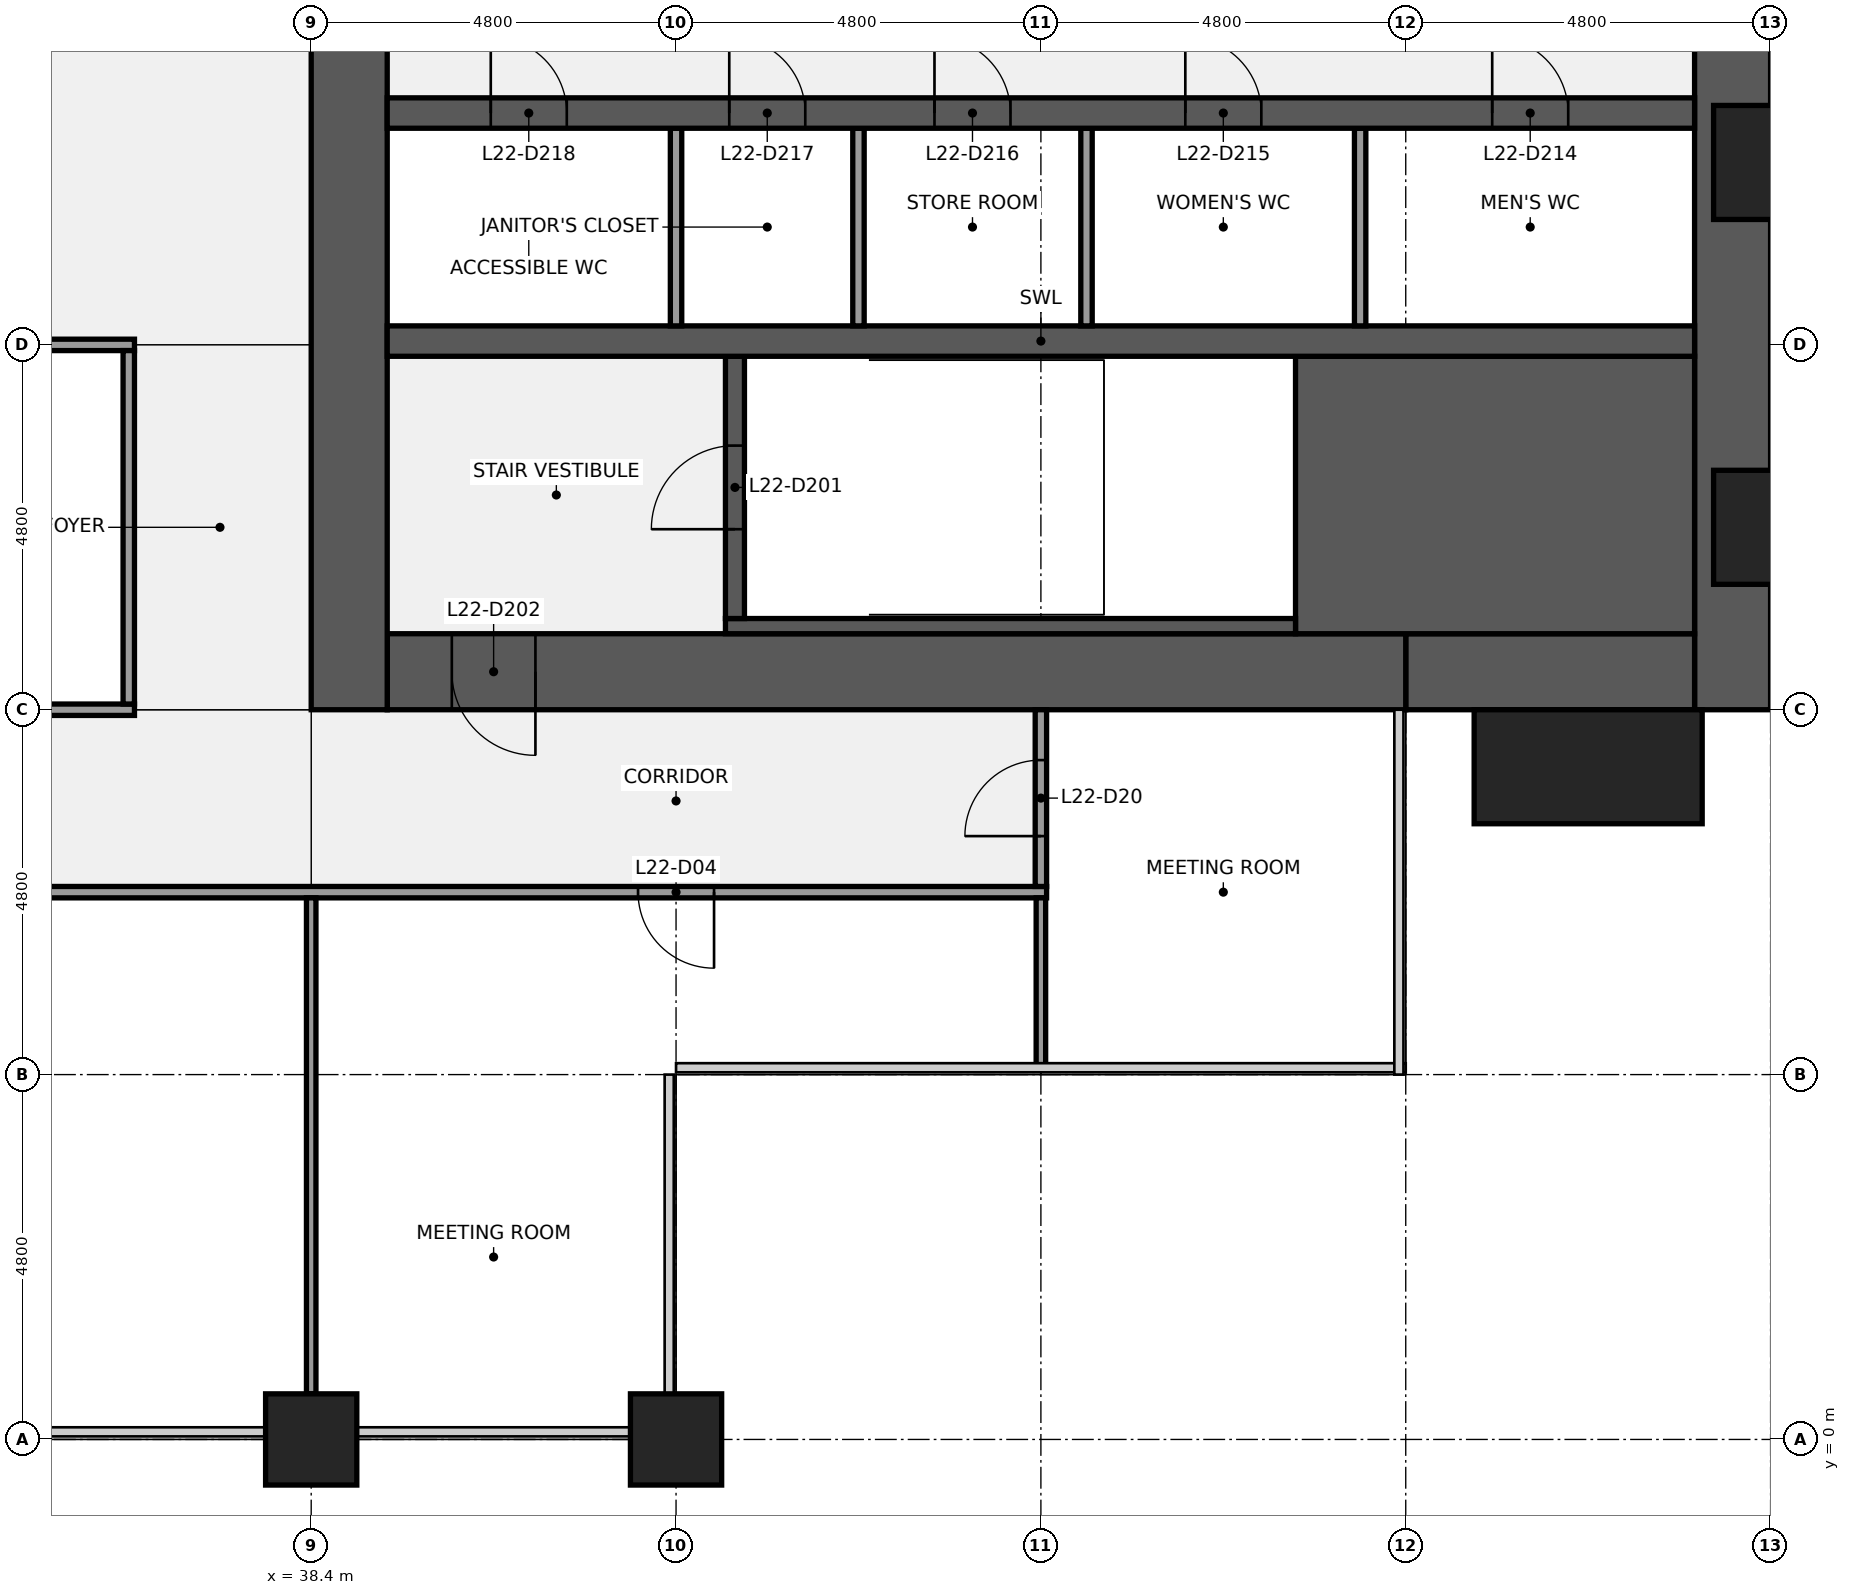
"""IFC4 building model, lengths in metres.
Left out: names, types, materials, properties, quantities, classifications, styles, units other than length and angle.
Written with IfcOpenShell. Run it as: python <this file> out.ifc"""

import sys

from ifc_helpers import new_model, si_unit, direction, frame, frame_2d, origin, origin_2d, place, context, subcontext, project, spatial, rectangle, extrude, element, fill, save


model = new_model("IFC4")
c1 = context("Model", 3, precision=1e-05, world=origin(), true_north=direction((0.0, 1.0)))
c2 = subcontext(c1, "Body", "Model", "MODEL_VIEW")
j1 = project(units=[si_unit("LENGTHUNIT", "METRE"), si_unit("PLANEANGLEUNIT", "RADIAN")], contexts=[c1])
p1 = place(None, origin())
s1 = spatial("IfcSite", under=j1, at=p1, CompositionType="ELEMENT")
p2 = place(p1, origin())
s2 = spatial("IfcBuilding", under=s1, at=p2, CompositionType="ELEMENT")
p3 = place(p2, frame((0.0, 0.0, 108.1)))
s3 = spatial("IfcBuildingStorey", under=s2, at=p3, CompositionType="ELEMENT", Elevation=108.1)
for number, where, z_axis, x_axis in (
    (1, (38.4, 0.0, 0.0), (0.0, 0.0, 1.0), (1.0, 0.0, 0.0)),
    (2, (43.2, 0.0, 0.0), (0.0, 0.0, 1.0), (1.0, 0.0, 0.0)),
):
    element("IfcColumn", number, at=place(p3, frame(where, z_axis=z_axis, x_axis=x_axis)), inside=s3, PredefinedType="COLUMN", context=c2, shape_type="SweptSolid", body=[
        extrude(rectangle(XDim=1.2, YDim=1.2, at=origin_2d()), origin(), (0.0, 0.0, 1.0), 4.0),
    ])
p4 = place(p3, frame((57.1, 38.4, 0.0), z_axis=(0.0, 0.0, 1.0), x_axis=(0.0, -1.0, 0.0)))
e3 = element("IfcWall", 3, at=p4, inside=s3, PredefinedType="SHEAR", context=c2, shape_type="SweptSolid", body=[
    extrude(rectangle(XDim=28.8, YDim=1.0, at=frame_2d((14.4, 0.0))), origin(), (0.0, 0.0, 1.0), 3.84),
])
p5 = place(p4, frame((18.45, 0.0, 0.9)))
e4 = element("IfcOpeningElement", 4, at=p5, cuts=e3, PredefinedType="OPENING", context=c2, shape_type="SweptSolid", body=[
    extrude(rectangle(XDim=1.5, YDim=1.5, at=frame_2d((0.75, 0.75))), frame((0.0, 0.51, 0.0), z_axis=(0.0, -1.0, 0.0), x_axis=(1.0, 0.0, 0.0)), (0.0, 0.0, 1.0), 1.02),
])
p6 = place(p4, frame((8.85, 0.0, 0.9)))
e5 = element("IfcOpeningElement", 5, at=p6, cuts=e3, PredefinedType="OPENING", context=c2, shape_type="SweptSolid", body=[
    extrude(rectangle(XDim=1.5, YDim=1.5, at=frame_2d((0.75, 0.75))), frame((0.0, 0.51, 0.0), z_axis=(0.0, -1.0, 0.0), x_axis=(1.0, 0.0, 0.0)), (0.0, 0.0, 1.0), 1.02),
])
p7 = place(p3, frame((56.6, 10.1, 0.0), z_axis=(0.0, 0.0, 1.0), x_axis=(-1.0, 0.0, 0.0)))
e6 = element("IfcWall", 6, at=p7, inside=s3, PredefinedType="SHEAR", context=c2, shape_type="SweptSolid", body=[
    extrude(rectangle(XDim=3.8, YDim=1.0, at=frame_2d((1.9, 0.0))), origin(), (0.0, 0.0, 1.0), 3.84),
])
p8 = place(p3, frame((52.8, 10.1, 0.0), z_axis=(0.0, 0.0, 1.0), x_axis=(-1.0, 0.0, 0.0)))
e7 = element("IfcWall", 7, at=p8, inside=s3, PredefinedType="SHEAR", context=c2, shape_type="SweptSolid", body=[
    extrude(rectangle(XDim=13.4, YDim=1.0, at=frame_2d((6.7, 0.0))), origin(), (0.0, 0.0, 1.0), 3.84),
])
p9 = place(p8, frame((11.45, 0.0, 0.0)))
e8 = element("IfcOpeningElement", 8, at=p9, cuts=e7, PredefinedType="OPENING", context=c2, shape_type="SweptSolid", body=[
    extrude(rectangle(XDim=1.1, YDim=2.1, at=frame_2d((0.55, 1.05))), frame((0.0, 0.51, 0.0), z_axis=(0.0, -1.0, 0.0), x_axis=(1.0, 0.0, 0.0)), (0.0, 0.0, 1.0), 1.02),
])
p10 = place(p3, frame((38.9, 9.6, 0.0), z_axis=(0.0, 0.0, 1.0), x_axis=(0.0, 1.0, 0.0)))
e9 = element("IfcWall", 9, at=p10, inside=s3, PredefinedType="SHEAR", context=c2, shape_type="SweptSolid", body=[
    extrude(rectangle(XDim=28.8, YDim=1.0, at=frame_2d((14.4, 0.0))), origin(), (0.0, 0.0, 1.0), 3.84),
])
p11 = place(p10, frame((8.7, 0.0, 0.0)))
e10 = element("IfcOpeningElement", 10, at=p11, cuts=e9, PredefinedType="OPENING", context=c2, shape_type="SweptSolid", body=[
    extrude(rectangle(XDim=1.8, YDim=2.1, at=frame_2d((0.9, 1.05))), frame((0.0, 0.51, 0.0), z_axis=(0.0, -1.0, 0.0), x_axis=(1.0, 0.0, 0.0)), (0.0, 0.0, 1.0), 1.02),
])
p12 = place(p10, frame((18.3, 0.0, 0.0)))
e11 = element("IfcOpeningElement", 11, at=p12, cuts=e9, PredefinedType="OPENING", context=c2, shape_type="SweptSolid", body=[
    extrude(rectangle(XDim=1.8, YDim=2.1, at=frame_2d((0.9, 1.05))), frame((0.0, 0.51, 0.0), z_axis=(0.0, -1.0, 0.0), x_axis=(1.0, 0.0, 0.0)), (0.0, 0.0, 1.0), 1.02),
])
p13 = place(p3, frame((51.35, 12.425, 0.0), z_axis=(0.0, 0.0, 1.0), x_axis=(1.0, 0.0, 0.0)))
e12 = element("IfcWall", 12, at=p13, inside=s3, PredefinedType="SHEAR", context=c2, shape_type="SweptSolid", body=[
    extrude(rectangle(XDim=5.25, YDim=3.65, at=frame_2d((2.625, 0.0))), origin(), (0.0, 0.0, 1.0), 3.84),
])
p14 = place(p3, frame((43.85, 10.7, 0.0), z_axis=(0.0, 0.0, 1.0), x_axis=(1.0, 0.0, 0.0)))
e13 = element("IfcWall", 13, at=p14, inside=s3, PredefinedType="SHEAR", context=c2, shape_type="SweptSolid", body=[
    extrude(rectangle(XDim=7.5, YDim=0.2, at=frame_2d((3.75, 0.0))), origin(), (0.0, 0.0, 1.0), 3.84),
])
p15 = place(p3, frame((43.975, 10.8, 0.0), z_axis=(0.0, 0.0, 1.0), x_axis=(0.0, 1.0, 0.0)))
e14 = element("IfcWall", 14, at=p15, inside=s3, PredefinedType="SHEAR", context=c2, shape_type="SweptSolid", body=[
    extrude(rectangle(XDim=3.45, YDim=0.25, at=frame_2d((1.725, 0.0))), origin(), (0.0, 0.0, 1.0), 3.84),
])
p16 = place(p15, frame((1.175, 0.0, 0.0)))
e15 = element("IfcOpeningElement", 15, at=p16, cuts=e14, PredefinedType="OPENING", context=c2, shape_type="SweptSolid", body=[
    extrude(rectangle(XDim=1.1, YDim=2.1, at=frame_2d((0.55, 1.05))), frame((0.0, 0.135, 0.0), z_axis=(0.0, -1.0, 0.0), x_axis=(1.0, 0.0, 0.0)), (0.0, 0.0, 1.0), 0.27),
])
p17 = place(p3, frame((39.4, 14.45, 0.0), z_axis=(0.0, 0.0, 1.0), x_axis=(1.0, 0.0, 0.0)))
e16 = element("IfcWall", 16, at=p17, inside=s3, PredefinedType="SHEAR", context=c2, shape_type="SweptSolid", body=[
    extrude(rectangle(XDim=17.2, YDim=0.4, at=frame_2d((8.6, 0.0))), origin(), (0.0, 0.0, 1.0), 3.84),
])
for number, where, z_axis, x_axis in (
    (17, (52.2, 14.65, 0.0), (0.0, 0.0, 1.0), (0.0, 1.0, 0.0)),
    (18, (48.6, 14.65, 0.0), (0.0, 0.0, 1.0), (0.0, 1.0, 0.0)),
    (19, (45.6, 14.65, 0.0), (0.0, 0.0, 1.0), (0.0, 1.0, 0.0)),
    (20, (43.2, 14.65, 0.0), (0.0, 0.0, 1.0), (0.0, 1.0, 0.0)),
):
    element("IfcWall", number, at=place(p3, frame(where, z_axis=z_axis, x_axis=x_axis)), inside=s3, PredefinedType="PARTITIONING", context=c2, shape_type="SweptSolid", body=[
        extrude(rectangle(XDim=2.6, YDim=0.15, at=frame_2d((1.3, 0.0))), origin(), (0.0, 0.0, 1.0), 3.84),
    ])
p18 = place(p3, frame((39.4, 17.45, 0.0), z_axis=(0.0, 0.0, 1.0), x_axis=(1.0, 0.0, 0.0)))
e21 = element("IfcWall", 21, at=p18, inside=s3, PredefinedType="SHEAR", context=c2, shape_type="SweptSolid", body=[
    extrude(rectangle(XDim=17.2, YDim=0.4, at=frame_2d((8.6, 0.0))), origin(), (0.0, 0.0, 1.0), 3.84),
])
p19 = place(p18, frame((14.538, 0.0, 0.0)))
e22 = element("IfcOpeningElement", 22, at=p19, cuts=e21, PredefinedType="OPENING", context=c2, shape_type="SweptSolid", body=[
    extrude(rectangle(XDim=1.0, YDim=2.1, at=frame_2d((0.5, 1.05))), frame((0.0, 0.21, 0.0), z_axis=(0.0, -1.0, 0.0), x_axis=(1.0, 0.0, 0.0)), (0.0, 0.0, 1.0), 0.42),
])
p20 = place(p18, frame((10.5, 0.0, 0.0)))
e23 = element("IfcOpeningElement", 23, at=p20, cuts=e21, PredefinedType="OPENING", context=c2, shape_type="SweptSolid", body=[
    extrude(rectangle(XDim=1.0, YDim=2.1, at=frame_2d((0.5, 1.05))), frame((0.0, 0.21, 0.0), z_axis=(0.0, -1.0, 0.0), x_axis=(1.0, 0.0, 0.0)), (0.0, 0.0, 1.0), 0.42),
])
p21 = place(p18, frame((7.2, 0.0, 0.0)))
e24 = element("IfcOpeningElement", 24, at=p21, cuts=e21, PredefinedType="OPENING", context=c2, shape_type="SweptSolid", body=[
    extrude(rectangle(XDim=1.0, YDim=2.1, at=frame_2d((0.5, 1.05))), frame((0.0, 0.21, 0.0), z_axis=(0.0, -1.0, 0.0), x_axis=(1.0, 0.0, 0.0)), (0.0, 0.0, 1.0), 0.42),
])
p22 = place(p18, frame((4.5, 0.0, 0.0)))
e25 = element("IfcOpeningElement", 25, at=p22, cuts=e21, PredefinedType="OPENING", context=c2, shape_type="SweptSolid", body=[
    extrude(rectangle(XDim=1.0, YDim=2.1, at=frame_2d((0.5, 1.05))), frame((0.0, 0.21, 0.0), z_axis=(0.0, -1.0, 0.0), x_axis=(1.0, 0.0, 0.0)), (0.0, 0.0, 1.0), 0.42),
])
p23 = place(p18, frame((1.363, 0.0, 0.0)))
e26 = element("IfcOpeningElement", 26, at=p23, cuts=e21, PredefinedType="OPENING", context=c2, shape_type="SweptSolid", body=[
    extrude(rectangle(XDim=1.0, YDim=2.1, at=frame_2d((0.5, 1.05))), frame((0.0, 0.21, 0.0), z_axis=(0.0, -1.0, 0.0), x_axis=(1.0, 0.0, 0.0)), (0.0, 0.0, 1.0), 0.42),
])
p24 = place(p3, frame((9.7, 7.2, 0.0), z_axis=(0.0, 0.0, 1.0), x_axis=(1.0, 0.0, 0.0)))
e27 = element("IfcWall", 27, at=p24, inside=s3, PredefinedType="PARTITIONING", context=c2, shape_type="SweptSolid", body=[
    extrude(rectangle(XDim=38.375, YDim=0.15, at=frame_2d((19.188, 0.0))), origin(), (0.0, 0.0, 1.0), 2.936),
])
p25 = place(p24, frame((4.25, 0.0, 0.0)))
e28 = element("IfcOpeningElement", 28, at=p25, cuts=e27, PredefinedType="OPENING", context=c2, shape_type="SweptSolid", body=[
    extrude(rectangle(XDim=1.0, YDim=2.1, at=frame_2d((0.5, 1.05))), frame((0.0, 0.085, 0.0), z_axis=(0.0, -1.0, 0.0), x_axis=(1.0, 0.0, 0.0)), (0.0, 0.0, 1.0), 0.17),
])
p26 = place(p24, frame((13.8, 0.0, 0.0)))
e29 = element("IfcOpeningElement", 29, at=p26, cuts=e27, PredefinedType="OPENING", context=c2, shape_type="SweptSolid", body=[
    extrude(rectangle(XDim=1.0, YDim=2.1, at=frame_2d((0.5, 1.05))), frame((0.0, 0.085, 0.0), z_axis=(0.0, -1.0, 0.0), x_axis=(1.0, 0.0, 0.0)), (0.0, 0.0, 1.0), 0.17),
])
p27 = place(p24, frame((23.4, 0.0, 0.0)))
e30 = element("IfcOpeningElement", 30, at=p27, cuts=e27, PredefinedType="OPENING", context=c2, shape_type="SweptSolid", body=[
    extrude(rectangle(XDim=1.0, YDim=2.1, at=frame_2d((0.5, 1.05))), frame((0.0, 0.085, 0.0), z_axis=(0.0, -1.0, 0.0), x_axis=(1.0, 0.0, 0.0)), (0.0, 0.0, 1.0), 0.17),
])
p28 = place(p24, frame((33.0, 0.0, 0.0)))
e31 = element("IfcOpeningElement", 31, at=p28, cuts=e27, PredefinedType="OPENING", context=c2, shape_type="SweptSolid", body=[
    extrude(rectangle(XDim=1.0, YDim=2.1, at=frame_2d((0.5, 1.05))), frame((0.0, 0.085, 0.0), z_axis=(0.0, -1.0, 0.0), x_axis=(1.0, 0.0, 0.0)), (0.0, 0.0, 1.0), 0.17),
])
p29 = place(p3, frame((21.525, 9.6, 0.0), z_axis=(0.0, 0.0, 1.0), x_axis=(1.0, 0.0, 0.0)))
e32 = element("IfcWall", 32, at=p29, inside=s3, PredefinedType="PARTITIONING", context=c2, shape_type="SweptSolid", body=[
    extrude(rectangle(XDim=14.55, YDim=0.15, at=frame_2d((7.275, 0.0))), origin(), (0.0, 0.0, 1.0), 2.936),
])
p30 = place(p29, frame((3.175, 0.0, 0.0)))
e33 = element("IfcOpeningElement", 33, at=p30, cuts=e32, PredefinedType="OPENING", context=c2, shape_type="SweptSolid", body=[
    extrude(rectangle(XDim=1.0, YDim=2.1, at=frame_2d((0.5, 1.05))), frame((0.0, 0.085, 0.0), z_axis=(0.0, -1.0, 0.0), x_axis=(1.0, 0.0, 0.0)), (0.0, 0.0, 1.0), 0.17),
])
p31 = place(p29, frame((10.375, 0.0, 0.0)))
e34 = element("IfcOpeningElement", 34, at=p31, cuts=e32, PredefinedType="OPENING", context=c2, shape_type="SweptSolid", body=[
    extrude(rectangle(XDim=1.0, YDim=2.1, at=frame_2d((0.5, 1.05))), frame((0.0, 0.085, 0.0), z_axis=(0.0, -1.0, 0.0), x_axis=(1.0, 0.0, 0.0)), (0.0, 0.0, 1.0), 0.17),
])
p32 = place(p3, frame((31.275, 14.4, 0.0), z_axis=(0.0, 0.0, 1.0), x_axis=(1.0, 0.0, 0.0)))
e35 = element("IfcWall", 35, at=p32, inside=s3, PredefinedType="PARTITIONING", context=c2, shape_type="SweptSolid", body=[
    extrude(rectangle(XDim=4.8, YDim=0.15, at=frame_2d((2.4, 0.0))), origin(), (0.0, 0.0, 1.0), 2.936),
])
p33 = place(p3, frame((36.0, 9.675, 0.0), z_axis=(0.0, 0.0, 1.0), x_axis=(0.0, 1.0, 0.0)))
e36 = element("IfcWall", 36, at=p33, inside=s3, PredefinedType="PARTITIONING", context=c2, shape_type="SweptSolid", body=[
    extrude(rectangle(XDim=4.65, YDim=0.15, at=frame_2d((2.325, 0.0))), origin(), (0.0, 0.0, 1.0), 2.936),
])
p34 = place(p3, frame((38.4, 0.6, 0.0), z_axis=(0.0, 0.0, 1.0), x_axis=(0.0, 1.0, 0.0)))
e37 = element("IfcWall", 37, at=p34, inside=s3, PredefinedType="PARTITIONING", context=c2, shape_type="SweptSolid", body=[
    extrude(rectangle(XDim=6.525, YDim=0.125, at=frame_2d((3.262, 0.0))), origin(), (0.0, 0.0, 1.0), 2.936),
])
p35 = place(p3, frame((48.0, 4.9, 0.0), z_axis=(0.0, 0.0, 1.0), x_axis=(0.0, 1.0, 0.0)))
e38 = element("IfcWall", 38, at=p35, inside=s3, PredefinedType="PARTITIONING", context=c2, shape_type="SweptSolid", body=[
    extrude(rectangle(XDim=2.225, YDim=0.125, at=frame_2d((1.113, 0.0))), origin(), (0.0, 0.0, 1.0), 2.936),
])
p36 = place(p3, frame((48.0, 7.275, 0.0), z_axis=(0.0, 0.0, 1.0), x_axis=(0.0, 1.0, 0.0)))
e39 = element("IfcWall", 39, at=p36, inside=s3, PredefinedType="PARTITIONING", context=c2, shape_type="SweptSolid", body=[
    extrude(rectangle(XDim=2.325, YDim=0.15, at=frame_2d((1.163, 0.0))), origin(), (0.0, 0.0, 1.0), 2.936),
])
p37 = place(p36, frame((0.663, 0.0, 0.0)))
e40 = element("IfcOpeningElement", 40, at=p37, cuts=e39, PredefinedType="OPENING", context=c2, shape_type="SweptSolid", body=[
    extrude(rectangle(XDim=1.0, YDim=2.1, at=frame_2d((0.5, 1.05))), frame((0.0, 0.085, 0.0), z_axis=(0.0, -1.0, 0.0), x_axis=(1.0, 0.0, 0.0)), (0.0, 0.0, 1.0), 0.17),
])
p38 = place(p3, frame((55.2, 8.85, 0.0), z_axis=(0.0, 0.0, 1.0), x_axis=(1.0, 0.0, 0.0)))
e41 = element("IfcColumn", 41, at=p38, inside=s3, PredefinedType="PILASTER", context=c2, shape_type="SweptSolid", body=[
    extrude(rectangle(XDim=3.0, YDim=1.5, at=origin_2d()), origin(), (0.0, 0.0, 1.0), 4.0),
])
for number, where, z_axis, x_axis in (
    (42, (38.4, -1.05, 0.0), (0.0, 0.0, 1.0), (1.0, 0.0, 0.0)),
    (43, (43.2, -1.05, 0.0), (0.0, 0.0, 1.0), (1.0, 0.0, 0.0)),
):
    element("IfcColumn", number, at=place(p3, frame(where, z_axis=z_axis, x_axis=x_axis)), inside=s3, PredefinedType="PILASTER", context=c2, shape_type="SweptSolid", body=[
        extrude(rectangle(XDim=3.6, YDim=0.9, at=origin_2d()), origin(), (0.0, 0.0, 1.0), 4.0),
    ])
p39 = place(p16, origin())
e44 = element("IfcDoor", 44, at=p39, inside=s3, OperationType="SINGLE_SWING_LEFT", PredefinedType="DOOR", context=c2, shape_type="SweptSolid", body=[
    extrude(rectangle(XDim=1.1, YDim=2.1, at=frame_2d((0.55, 1.05))), frame((0.0, 0.025, 0.0), z_axis=(0.0, -1.0, 0.0), x_axis=(1.0, 0.0, 0.0)), (0.0, 0.0, 1.0), 0.05),
])
fill(e15, e44)
p40 = place(p9, origin())
e45 = element("IfcDoor", 45, at=p40, inside=s3, OperationType="SINGLE_SWING_LEFT", PredefinedType="DOOR", context=c2, shape_type="SweptSolid", body=[
    extrude(rectangle(XDim=1.1, YDim=2.1, at=frame_2d((0.55, 1.05))), frame((0.0, 0.025, 0.0), z_axis=(0.0, -1.0, 0.0), x_axis=(1.0, 0.0, 0.0)), (0.0, 0.0, 1.0), 0.05),
])
fill(e8, e45)
p41 = place(p19, origin())
e46 = element("IfcDoor", 46, at=p41, inside=s3, OperationType="SINGLE_SWING_LEFT", PredefinedType="DOOR", context=c2, shape_type="SweptSolid", body=[
    extrude(rectangle(XDim=1.0, YDim=2.1, at=frame_2d((0.5, 1.05))), frame((0.0, 0.025, 0.0), z_axis=(0.0, -1.0, 0.0), x_axis=(1.0, 0.0, 0.0)), (0.0, 0.0, 1.0), 0.05),
])
fill(e22, e46)
p42 = place(p20, origin())
e47 = element("IfcDoor", 47, at=p42, inside=s3, OperationType="SINGLE_SWING_LEFT", PredefinedType="DOOR", context=c2, shape_type="SweptSolid", body=[
    extrude(rectangle(XDim=1.0, YDim=2.1, at=frame_2d((0.5, 1.05))), frame((0.0, 0.025, 0.0), z_axis=(0.0, -1.0, 0.0), x_axis=(1.0, 0.0, 0.0)), (0.0, 0.0, 1.0), 0.05),
])
fill(e23, e47)
p43 = place(p21, origin())
e48 = element("IfcDoor", 48, at=p43, inside=s3, OperationType="SINGLE_SWING_LEFT", PredefinedType="DOOR", context=c2, shape_type="SweptSolid", body=[
    extrude(rectangle(XDim=1.0, YDim=2.1, at=frame_2d((0.5, 1.05))), frame((0.0, 0.025, 0.0), z_axis=(0.0, -1.0, 0.0), x_axis=(1.0, 0.0, 0.0)), (0.0, 0.0, 1.0), 0.05),
])
fill(e24, e48)
p44 = place(p22, origin())
e49 = element("IfcDoor", 49, at=p44, inside=s3, OperationType="SINGLE_SWING_LEFT", PredefinedType="DOOR", context=c2, shape_type="SweptSolid", body=[
    extrude(rectangle(XDim=1.0, YDim=2.1, at=frame_2d((0.5, 1.05))), frame((0.0, 0.025, 0.0), z_axis=(0.0, -1.0, 0.0), x_axis=(1.0, 0.0, 0.0)), (0.0, 0.0, 1.0), 0.05),
])
fill(e25, e49)
p45 = place(p23, origin())
e50 = element("IfcDoor", 50, at=p45, inside=s3, OperationType="SINGLE_SWING_LEFT", PredefinedType="DOOR", context=c2, shape_type="SweptSolid", body=[
    extrude(rectangle(XDim=1.0, YDim=2.1, at=frame_2d((0.5, 1.05))), frame((0.0, 0.025, 0.0), z_axis=(0.0, -1.0, 0.0), x_axis=(1.0, 0.0, 0.0)), (0.0, 0.0, 1.0), 0.05),
])
fill(e26, e50)
p46 = place(p28, origin())
e51 = element("IfcDoor", 51, at=p46, inside=s3, OperationType="SINGLE_SWING_RIGHT", PredefinedType="DOOR", context=c2, shape_type="SweptSolid", body=[
    extrude(rectangle(XDim=1.0, YDim=2.1, at=frame_2d((0.5, 1.05))), frame((0.0, 0.025, 0.0), z_axis=(0.0, -1.0, 0.0), x_axis=(1.0, 0.0, 0.0)), (0.0, 0.0, 1.0), 0.05),
])
fill(e31, e51)
p47 = place(p37, origin())
e52 = element("IfcDoor", 52, at=p47, inside=s3, OperationType="SINGLE_SWING_LEFT", PredefinedType="DOOR", context=c2, shape_type="SweptSolid", body=[
    extrude(rectangle(XDim=1.0, YDim=2.1, at=frame_2d((0.5, 1.05))), frame((0.0, 0.025, 0.0), z_axis=(0.0, -1.0, 0.0), x_axis=(1.0, 0.0, 0.0)), (0.0, 0.0, 1.0), 0.05),
])
fill(e40, e52)
save(model, sys.argv[1])
